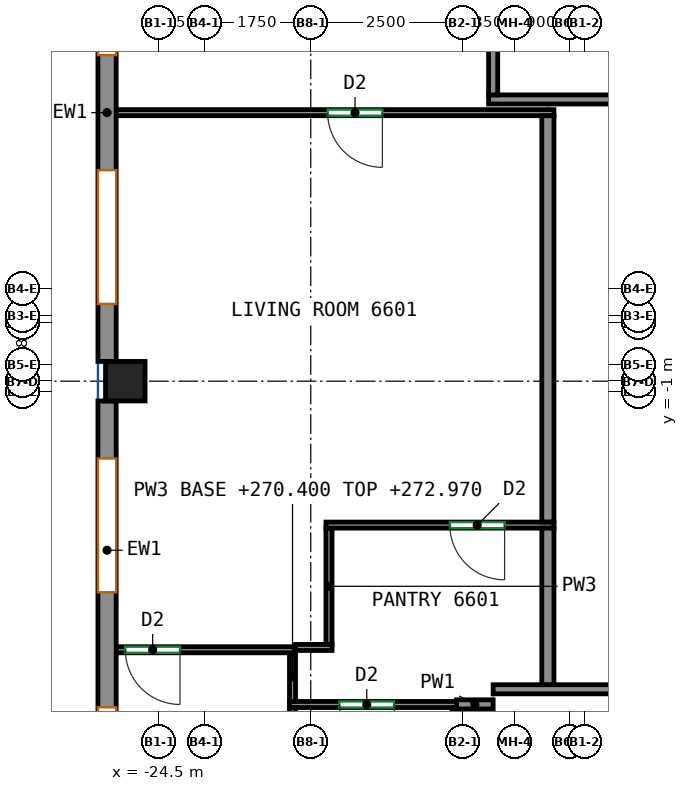
"""IFC4 building model, lengths in metres.
Left out: names, types, materials, properties, quantities, classifications, styles, units other than length and angle.
Written with IfcOpenShell. Run it as: python <this file> out.ifc"""

import sys

from ifc_helpers import new_model, si_unit, direction, frame, frame_2d, origin, origin_2d, place, context, subcontext, project, spatial, rectangle, extrude, source, transform, mapped, element, fill, save


model = new_model("IFC4")
c1 = context("Model", 3, precision=1e-05, world=origin(), true_north=direction((0.0, 1.0)))
c2 = subcontext(c1, "Body", "Model", "MODEL_VIEW")
j1 = project(units=[si_unit("LENGTHUNIT", "METRE"), si_unit("PLANEANGLEUNIT", "RADIAN")], contexts=[c1])
p1 = place(None, origin())
s1 = spatial("IfcSite", under=j1, at=p1, CompositionType="ELEMENT")
p2 = place(p1, origin())
s2 = spatial("IfcBuilding", under=s1, at=p2, CompositionType="ELEMENT")
p3 = place(p2, frame((0.0, 0.0, 270.4)))
s3 = spatial("IfcBuildingStorey", under=s2, at=p3, CompositionType="ELEMENT", Elevation=270.4)
m1 = source(origin(), c2, "Body", "SweptSolid", [
    extrude(rectangle(XDim=0.65, YDim=0.65, at=origin_2d()), origin(), (0.0, 0.0, 1.0), 3.12),
])
p4 = place(p3, frame((-25.05, -0.833, 0.0), z_axis=(0.0, 0.0, 1.0), x_axis=(1.0, 0.0, 0.0)))
e1 = element("IfcColumn", 1, at=p4, inside=s3, PredefinedType="COLUMN", context=c2, shape_type="MappedRepresentation", body=[
    mapped(m1, transform((0.0, 0.0, 0.0))),
])
m2 = source(origin(), c2, "Body", "SweptSolid", [
    extrude(rectangle(XDim=8.183, YDim=0.3, at=frame_2d((4.092, 0.0))), origin(), (0.0, 0.0, 1.0), 3.12),
])
p5 = place(p3, frame((-25.35, 7.675, 0.0), z_axis=(0.0, 0.0, 1.0), x_axis=(0.0, -1.0, 0.0)))
e2 = element("IfcWall", 2, at=p5, inside=s3, PredefinedType="SOLIDWALL", context=c2, shape_type="MappedRepresentation", body=[
    mapped(m2, transform((0.0, 0.0, 0.0))),
])
p6 = place(p5, frame((0.946, 0.0, 0.8)))
e3 = element("IfcOpeningElement", 3, at=p6, cuts=e2, PredefinedType="OPENING", context=c2, shape_type="SweptSolid", body=[
    extrude(rectangle(XDim=2.2, YDim=2.05, at=frame_2d((1.1, 1.025))), frame((0.0, 0.16, 0.0), z_axis=(0.0, -1.0, 0.0), x_axis=(1.0, 0.0, 0.0)), (0.0, 0.0, 1.0), 0.32),
])
p7 = place(p5, frame((5.037, 0.0, 0.8)))
e4 = element("IfcOpeningElement", 4, at=p7, cuts=e2, PredefinedType="OPENING", context=c2, shape_type="SweptSolid", body=[
    extrude(rectangle(XDim=2.2, YDim=2.05, at=frame_2d((1.1, 1.025))), frame((0.0, 0.16, 0.0), z_axis=(0.0, -1.0, 0.0), x_axis=(1.0, 0.0, 0.0)), (0.0, 0.0, 1.0), 0.32),
])
m3 = source(origin(), c2, "Body", "SweptSolid", [
    extrude(rectangle(XDim=8.184, YDim=0.3, at=frame_2d((4.092, 0.0))), origin(), (0.0, 0.0, 1.0), 3.12),
])
p8 = place(p3, frame((-25.35, -1.158, 0.0), z_axis=(0.0, 0.0, 1.0), x_axis=(0.0, -1.0, 0.0)))
e5 = element("IfcWall", 5, at=p8, inside=s3, PredefinedType="SOLIDWALL", context=c2, shape_type="MappedRepresentation", body=[
    mapped(m3, transform((0.0, 0.0, 0.0))),
])
p9 = place(p8, frame((0.946, 0.0, 0.8)))
e6 = element("IfcOpeningElement", 6, at=p9, cuts=e5, PredefinedType="OPENING", context=c2, shape_type="SweptSolid", body=[
    extrude(rectangle(XDim=2.2, YDim=2.05, at=frame_2d((1.1, 1.025))), frame((0.0, 0.16, 0.0), z_axis=(0.0, -1.0, 0.0), x_axis=(1.0, 0.0, 0.0)), (0.0, 0.0, 1.0), 0.32),
])
p10 = place(p8, frame((5.038, 0.0, 0.8)))
e7 = element("IfcOpeningElement", 7, at=p10, cuts=e5, PredefinedType="OPENING", context=c2, shape_type="SweptSolid", body=[
    extrude(rectangle(XDim=2.2, YDim=2.05, at=frame_2d((1.1, 1.025))), frame((0.0, 0.16, 0.0), z_axis=(0.0, -1.0, 0.0), x_axis=(1.0, 0.0, 0.0)), (0.0, 0.0, 1.0), 0.32),
])
p11 = place(p3, frame((-19.602, -7.452, 0.0), z_axis=(0.0, 0.0, 1.0), x_axis=(0.0, 1.0, 0.0)))
e8 = element("IfcWall", 8, at=p11, inside=s3, PredefinedType="PARTITIONING", context=c2, shape_type="SweptSolid", body=[
    extrude(rectangle(XDim=1.229, YDim=0.15, at=frame_2d((0.615, 0.0))), origin(), (0.0, 0.0, 1.0), 3.12),
])
p12 = place(p3, frame((-19.0, -6.148, 0.0), z_axis=(0.0, 0.0, 1.0), x_axis=(-1.0, 0.0, 0.0)))
e9 = element("IfcWall", 9, at=p12, inside=s3, PredefinedType="PARTITIONING", context=c2, shape_type="SweptSolid", body=[
    extrude(rectangle(XDim=0.602, YDim=0.15, at=frame_2d((0.301, 0.0))), origin(), (0.0, 0.0, 1.0), 3.12),
])
p13 = place(p3, frame((-19.0, -5.9, 0.0), z_axis=(0.0, 0.0, 1.0), x_axis=(1.0, 0.0, 0.0)))
e10 = element("IfcWall", 10, at=p13, inside=s3, PredefinedType="PARTITIONING", context=c2, shape_type="SweptSolid", body=[
    extrude(rectangle(XDim=25.655, YDim=0.15, at=frame_2d((12.828, 0.0))), origin(), (0.0, 0.0, 1.0), 3.12),
])
p14 = place(p13, frame((4.796, 0.0, 0.0)))
e11 = element("IfcOpeningElement", 11, at=p14, cuts=e10, PredefinedType="OPENING", context=c2, shape_type="SweptSolid", body=[
    extrude(rectangle(XDim=0.9, YDim=2.1, at=frame_2d((0.45, 1.05))), frame((0.0, 0.085, 0.0), z_axis=(0.0, -1.0, 0.0), x_axis=(1.0, 0.0, 0.0)), (0.0, 0.0, 1.0), 0.17),
])
p15 = place(p13, frame((21.535, 0.0, 0.0)))
e12 = element("IfcOpeningElement", 12, at=p15, cuts=e10, PredefinedType="OPENING", context=c2, shape_type="SweptSolid", body=[
    extrude(rectangle(XDim=0.9, YDim=2.1, at=frame_2d((0.45, 1.05))), frame((0.0, 0.085, 0.0), z_axis=(0.0, -1.0, 0.0), x_axis=(1.0, 0.0, 0.0)), (0.0, 0.0, 1.0), 0.17),
])
p16 = place(p3, frame((-19.075, 3.8, 0.0), z_axis=(0.0, 0.0, 1.0), x_axis=(1.0, 0.0, 0.0)))
e13 = element("IfcWall", 13, at=p16, inside=s3, PredefinedType="PARTITIONING", context=c2, shape_type="SweptSolid", body=[
    extrude(rectangle(XDim=4.89, YDim=0.15, at=frame_2d((2.445, 0.0))), origin(), (0.0, 0.0, 1.0), 3.12),
])
p17 = place(p3, frame((-19.0, 3.875, 0.0), z_axis=(0.0, 0.0, 1.0), x_axis=(0.0, 1.0, 0.0)))
e14 = element("IfcWall", 14, at=p17, inside=s3, PredefinedType="PARTITIONING", context=c2, shape_type="SweptSolid", body=[
    extrude(rectangle(XDim=4.035, YDim=0.15, at=frame_2d((2.018, 0.0))), origin(), (0.0, 0.0, 1.0), 3.12),
])
p18 = place(p3, frame((-19.602, -6.15, 0.0), z_axis=(0.0, 0.0, 1.0), x_axis=(-1.0, 0.0, 0.0)))
e15 = element("IfcWall", 15, at=p18, inside=s3, PredefinedType="PARTITIONING", context=c2, shape_type="SweptSolid", body=[
    extrude(rectangle(XDim=2.748, YDim=0.1, at=frame_2d((1.374, 0.0))), origin(), (0.0, 0.0, 1.0), 3.12),
])
p19 = place(p18, frame((1.027, 0.0, 0.0)))
e16 = element("IfcOpeningElement", 16, at=p19, cuts=e15, PredefinedType="OPENING", context=c2, shape_type="SweptSolid", body=[
    extrude(rectangle(XDim=0.9, YDim=2.1, at=frame_2d((0.45, 1.05))), frame((0.0, 0.06, 0.0), z_axis=(0.0, -1.0, 0.0), x_axis=(1.0, 0.0, 0.0)), (0.0, 0.0, 1.0), 0.12),
])
p20 = place(p3, frame((-22.3, -9.05, 0.0), z_axis=(0.0, 0.0, 1.0), x_axis=(0.0, 1.0, 0.0)))
e17 = element("IfcWall", 17, at=p20, inside=s3, PredefinedType="PARTITIONING", context=c2, shape_type="SweptSolid", body=[
    extrude(rectangle(XDim=2.85, YDim=0.1, at=frame_2d((1.425, 0.0))), origin(), (0.0, 0.0, 1.0), 2.57),
])
p21 = place(p3, frame((-22.3, -6.1, 0.0), z_axis=(0.0, 0.0, 1.0), x_axis=(0.0, 1.0, 0.0)))
e18 = element("IfcWall", 18, at=p21, inside=s3, PredefinedType="PARTITIONING", context=c2, shape_type="SweptSolid", body=[
    extrude(rectangle(XDim=0.81, YDim=0.1, at=frame_2d((0.405, 0.0))), origin(), (0.0, 0.0, 1.0), 2.57),
])
p22 = place(p3, frame((-21.65, -5.212, 0.0), z_axis=(0.0, 0.0, 1.0), x_axis=(-1.0, 0.0, 0.0)))
e19 = element("IfcWall", 19, at=p22, inside=s3, PredefinedType="PARTITIONING", context=c2, shape_type="SweptSolid", body=[
    extrude(rectangle(XDim=0.602, YDim=0.1, at=frame_2d((0.301, 0.0))), origin(), (0.0, 0.0, 1.0), 3.12),
])
p23 = place(p3, frame((-21.7, -5.162, 0.0), z_axis=(0.0, 0.0, 1.0), x_axis=(0.0, 1.0, 0.0)))
e20 = element("IfcWall", 20, at=p23, inside=s3, PredefinedType="PARTITIONING", context=c2, shape_type="SweptSolid", body=[
    extrude(rectangle(XDim=1.912, YDim=0.1, at=frame_2d((0.956, 0.0))), origin(), (0.0, 0.0, 1.0), 2.57),
])
p24 = place(p3, frame((-18.0, -3.2, 0.0), z_axis=(0.0, 0.0, 1.0), x_axis=(-1.0, 0.0, 0.0)))
e21 = element("IfcWall", 21, at=p24, inside=s3, PredefinedType="PARTITIONING", context=c2, shape_type="SweptSolid", body=[
    extrude(rectangle(XDim=3.75, YDim=0.1, at=frame_2d((1.875, 0.0))), origin(), (0.0, 0.0, 1.0), 3.12),
])
p25 = place(p24, frame((0.812, 0.0, 0.0)))
e22 = element("IfcOpeningElement", 22, at=p25, cuts=e21, PredefinedType="OPENING", context=c2, shape_type="SweptSolid", body=[
    extrude(rectangle(XDim=0.9, YDim=2.1, at=frame_2d((0.45, 1.05))), frame((0.0, 0.06, 0.0), z_axis=(0.0, -1.0, 0.0), x_axis=(1.0, 0.0, 0.0)), (0.0, 0.0, 1.0), 0.12),
])
p26 = place(p3, frame((-18.1, -5.823, 0.0), z_axis=(0.0, 0.0, 1.0), x_axis=(0.0, 1.0, 0.0)))
e23 = element("IfcWall", 23, at=p26, inside=s3, PredefinedType="PARTITIONING", context=c2, shape_type="SweptSolid", body=[
    extrude(rectangle(XDim=2.573, YDim=0.2, at=frame_2d((1.287, 0.0))), origin(), (0.0, 0.0, 1.0), 3.12),
])
p27 = place(p3, frame((-22.252, -5.25, 0.0), z_axis=(0.0, 0.0, 1.0), x_axis=(-1.0, 0.0, 0.0)))
e24 = element("IfcWall", 24, at=p27, inside=s3, PredefinedType="PARTITIONING", context=c2, shape_type="SweptSolid", body=[
    extrude(rectangle(XDim=2.998, YDim=0.1, at=frame_2d((1.499, 0.0))), origin(), (0.0, 0.0, 1.0), 3.12),
])
p28 = place(p27, frame((1.898, 0.0, 0.0)))
e25 = element("IfcOpeningElement", 25, at=p28, cuts=e24, PredefinedType="OPENING", context=c2, shape_type="SweptSolid", body=[
    extrude(rectangle(XDim=0.9, YDim=2.1, at=frame_2d((0.45, 1.05))), frame((0.0, 0.06, 0.0), z_axis=(0.0, -1.0, 0.0), x_axis=(1.0, 0.0, 0.0)), (0.0, 0.0, 1.0), 0.12),
])
p29 = place(p3, frame((-18.0, 3.583, 0.0), z_axis=(0.0, 0.0, 1.0), x_axis=(-1.0, 0.0, 0.0)))
e26 = element("IfcWall", 26, at=p29, inside=s3, PredefinedType="PARTITIONING", context=c2, shape_type="SweptSolid", body=[
    extrude(rectangle(XDim=7.25, YDim=0.1, at=frame_2d((3.625, 0.0))), origin(), (0.0, 0.0, 1.0), 3.12),
])
p30 = place(p29, frame((2.822, 0.0, 0.0)))
e27 = element("IfcOpeningElement", 27, at=p30, cuts=e26, PredefinedType="OPENING", context=c2, shape_type="SweptSolid", body=[
    extrude(rectangle(XDim=0.9, YDim=2.1, at=frame_2d((0.45, 1.05))), frame((0.0, 0.06, 0.0), z_axis=(0.0, -1.0, 0.0), x_axis=(1.0, 0.0, 0.0)), (0.0, 0.0, 1.0), 0.12),
])
p31 = place(p3, frame((-18.1, -3.148, 0.0), z_axis=(0.0, 0.0, 1.0), x_axis=(0.0, 1.0, 0.0)))
e28 = element("IfcWall", 28, at=p31, inside=s3, PredefinedType="PARTITIONING", context=c2, shape_type="SweptSolid", body=[
    extrude(rectangle(XDim=6.681, YDim=0.2, at=frame_2d((3.34, 0.0))), origin(), (0.0, 0.0, 1.0), 3.12),
])
p32 = place(p6, origin())
e29 = element("IfcWindow", 29, at=p32, inside=s3, PartitioningType="SINGLE_PANEL", PredefinedType="WINDOW", context=c2, shape_type="SweptSolid", body=[
    extrude(rectangle(XDim=2.2, YDim=2.05, at=frame_2d((1.1, 1.025))), frame((0.0, 0.03, 0.0), z_axis=(0.0, -1.0, 0.0), x_axis=(1.0, 0.0, 0.0)), (0.0, 0.0, 1.0), 0.06),
])
fill(e3, e29)
p33 = place(p7, origin())
e30 = element("IfcWindow", 30, at=p33, inside=s3, PartitioningType="SINGLE_PANEL", PredefinedType="WINDOW", context=c2, shape_type="SweptSolid", body=[
    extrude(rectangle(XDim=2.2, YDim=2.05, at=frame_2d((1.1, 1.025))), frame((0.0, 0.03, 0.0), z_axis=(0.0, -1.0, 0.0), x_axis=(1.0, 0.0, 0.0)), (0.0, 0.0, 1.0), 0.06),
])
fill(e4, e30)
p34 = place(p9, origin())
e31 = element("IfcWindow", 31, at=p34, inside=s3, PartitioningType="SINGLE_PANEL", PredefinedType="WINDOW", context=c2, shape_type="SweptSolid", body=[
    extrude(rectangle(XDim=2.2, YDim=2.05, at=frame_2d((1.1, 1.025))), frame((0.0, 0.03, 0.0), z_axis=(0.0, -1.0, 0.0), x_axis=(1.0, 0.0, 0.0)), (0.0, 0.0, 1.0), 0.06),
])
fill(e6, e31)
p35 = place(p10, origin())
e32 = element("IfcWindow", 32, at=p35, inside=s3, PartitioningType="SINGLE_PANEL", PredefinedType="WINDOW", context=c2, shape_type="SweptSolid", body=[
    extrude(rectangle(XDim=2.2, YDim=2.05, at=frame_2d((1.1, 1.025))), frame((0.0, 0.03, 0.0), z_axis=(0.0, -1.0, 0.0), x_axis=(1.0, 0.0, 0.0)), (0.0, 0.0, 1.0), 0.06),
])
fill(e7, e32)
p36 = place(p19, origin())
e33 = element("IfcDoor", 33, at=p36, inside=s3, OperationType="SINGLE_SWING_LEFT", PredefinedType="DOOR", context=c2, shape_type="SweptSolid", body=[
    extrude(rectangle(XDim=0.9, YDim=2.1, at=frame_2d((0.45, 1.05))), frame((0.0, 0.025, 0.0), z_axis=(0.0, -1.0, 0.0), x_axis=(1.0, 0.0, 0.0)), (0.0, 0.0, 1.0), 0.05),
])
fill(e16, e33)
p37 = place(p28, origin())
e34 = element("IfcDoor", 34, at=p37, inside=s3, OperationType="SINGLE_SWING_LEFT", PredefinedType="DOOR", context=c2, shape_type="SweptSolid", body=[
    extrude(rectangle(XDim=0.9, YDim=2.1, at=frame_2d((0.45, 1.05))), frame((0.0, 0.025, 0.0), z_axis=(0.0, -1.0, 0.0), x_axis=(1.0, 0.0, 0.0)), (0.0, 0.0, 1.0), 0.05),
])
fill(e25, e34)
p38 = place(p25, origin())
e35 = element("IfcDoor", 35, at=p38, inside=s3, OperationType="SINGLE_SWING_LEFT", PredefinedType="DOOR", context=c2, shape_type="SweptSolid", body=[
    extrude(rectangle(XDim=0.9, YDim=2.1, at=frame_2d((0.45, 1.05))), frame((0.0, 0.025, 0.0), z_axis=(0.0, -1.0, 0.0), x_axis=(1.0, 0.0, 0.0)), (0.0, 0.0, 1.0), 0.05),
])
fill(e22, e35)
p39 = place(p30, origin())
e36 = element("IfcDoor", 36, at=p39, inside=s3, OperationType="SINGLE_SWING_LEFT", PredefinedType="DOOR", context=c2, shape_type="SweptSolid", body=[
    extrude(rectangle(XDim=0.9, YDim=2.1, at=frame_2d((0.45, 1.05))), frame((0.0, 0.025, 0.0), z_axis=(0.0, -1.0, 0.0), x_axis=(1.0, 0.0, 0.0)), (0.0, 0.0, 1.0), 0.05),
])
fill(e27, e36)
save(model, sys.argv[1])
